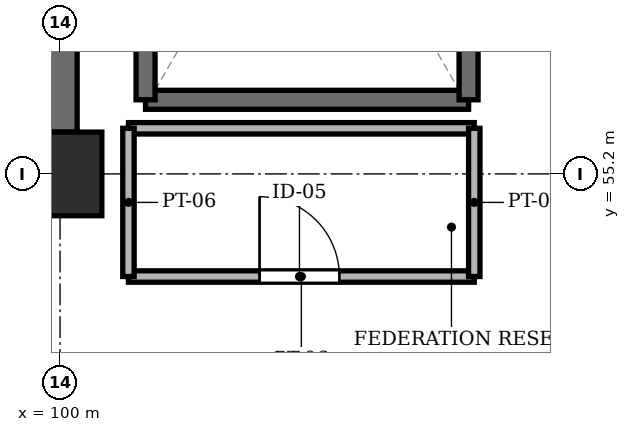
"""IFC4 building model, lengths in metres.
Left out: names, types, materials, properties, quantities, classifications, styles, units other than length and angle.
Written with IfcOpenShell. Run it as: python <this file> out.ifc"""

import sys

from ifc_helpers import new_model, si_unit, direction, frame, frame_2d, origin, origin_2d, place, context, subcontext, project, spatial, rectangle, extrude, element, fill, save


model = new_model("IFC4")
c1 = context("Model", 3, precision=1e-05, world=origin(), true_north=direction((0.0, 1.0)))
c2 = subcontext(c1, "Body", "Model", "MODEL_VIEW")
j1 = project(units=[si_unit("LENGTHUNIT", "METRE"), si_unit("PLANEANGLEUNIT", "RADIAN")], contexts=[c1])
p1 = place(None, origin())
s1 = spatial("IfcSite", under=j1, at=p1, CompositionType="ELEMENT")
p2 = place(p1, origin())
s2 = spatial("IfcBuilding", under=s1, at=p2, CompositionType="ELEMENT")
p3 = place(p2, frame((0.0, 0.0, 34.05)))
s3 = spatial("IfcBuildingStorey", under=s2, at=p3, CompositionType="ELEMENT", Elevation=34.05)
p4 = place(p3, frame((100.0, 55.2, -0.25), z_axis=(0.0, 0.0, 1.0), x_axis=(1.0, 0.0, 0.0)))
e1 = element("IfcColumn", 1, at=p4, inside=s3, PredefinedType="COLUMN", context=c2, shape_type="SweptSolid", body=[
    extrude(rectangle(XDim=1.1, YDim=1.1, at=origin_2d()), origin(), (0.0, 0.0, 1.0), 3.25),
])
p5 = place(p3, frame((100.0, 55.75, 0.0), z_axis=(0.0, 0.0, 1.0), x_axis=(0.0, 1.0, 0.0)))
e2 = element("IfcWall", 2, at=p5, inside=s3, PredefinedType="SHEAR", context=c2, shape_type="SweptSolid", body=[
    extrude(rectangle(XDim=6.2, YDim=0.45, at=frame_2d((3.1, 0.0))), origin(), (0.0, 0.0, 1.0), 3.0),
])
p6 = place(p3, frame((101.125, 56.175, 0.0), z_axis=(0.0, 0.0, 1.0), x_axis=(1.0, 0.0, 0.0)))
e3 = element("IfcWall", 3, at=p6, inside=s3, PredefinedType="SHEAR", context=c2, shape_type="SweptSolid", body=[
    extrude(rectangle(XDim=4.25, YDim=0.25, at=frame_2d((2.125, 0.0))), origin(), (0.0, 0.0, 1.0), 3.0),
])
for number, where, z_axis, x_axis in (
    (4, (101.125, 63.375, 0.0), (0.0, 0.0, 1.0), (0.0, -1.0, 0.0)),
    (5, (105.375, 56.175, 0.0), (0.0, 0.0, 1.0), (0.0, 1.0, 0.0)),
):
    element("IfcWall", number, at=place(p3, frame(where, z_axis=z_axis, x_axis=x_axis)), inside=s3, PredefinedType="SHEAR", context=c2, shape_type="SweptSolid", body=[
        extrude(rectangle(XDim=7.2, YDim=0.25, at=frame_2d((3.6, 0.0))), origin(), (0.0, 0.0, 1.0), 3.0),
    ])
p7 = place(p3, frame((100.9, 53.85, 0.0), z_axis=(0.0, 0.0, 1.0), x_axis=(1.0, 0.0, 0.0)))
e6 = element("IfcWall", 6, at=p7, inside=s3, PredefinedType="PARTITIONING", context=c2, shape_type="SweptSolid", body=[
    extrude(rectangle(XDim=4.55, YDim=0.15, at=frame_2d((2.275, 0.0))), origin(), (0.0, 0.0, 1.0), 2.53),
])
p8 = place(p7, frame((1.725, 0.0, 0.0)))
e7 = element("IfcOpeningElement", 7, at=p8, cuts=e6, PredefinedType="OPENING", context=c2, shape_type="SweptSolid", body=[
    extrude(rectangle(XDim=1.05, YDim=2.15, at=frame_2d((0.525, 1.075))), frame((0.0, 0.087, 0.0), z_axis=(0.0, -1.0, 0.0), x_axis=(1.0, 0.0, 0.0)), (0.0, 0.0, 1.0), 0.174),
])
p9 = place(p3, frame((100.9, 55.8, 0.0), z_axis=(0.0, 0.0, 1.0), x_axis=(1.0, 0.0, 0.0)))
e8 = element("IfcWall", 8, at=p9, inside=s3, PredefinedType="PARTITIONING", context=c2, shape_type="SweptSolid", body=[
    extrude(rectangle(XDim=4.55, YDim=0.15, at=frame_2d((2.275, 0.0))), origin(), (0.0, 0.0, 1.0), 2.53),
])
for number, where, z_axis, x_axis in (
    (9, (100.9, 53.85, 0.0), (0.0, 0.0, 1.0), (0.0, 1.0, 0.0)),
    (10, (105.45, 53.85, 0.0), (0.0, 0.0, 1.0), (0.0, 1.0, 0.0)),
):
    element("IfcWall", number, at=place(p3, frame(where, z_axis=z_axis, x_axis=x_axis)), inside=s3, PredefinedType="PARTITIONING", context=c2, shape_type="SweptSolid", body=[
        extrude(rectangle(XDim=1.95, YDim=0.15, at=frame_2d((0.975, 0.0))), origin(), (0.0, 0.0, 1.0), 2.53),
    ])
p10 = place(p8, origin())
e11 = element("IfcDoor", 11, at=p10, inside=s3, OperationType="SINGLE_SWING_LEFT", PredefinedType="DOOR", context=c2, shape_type="SweptSolid", body=[
    extrude(rectangle(XDim=1.05, YDim=2.15, at=frame_2d((0.525, 1.075))), frame((0.0, 0.025, 0.0), z_axis=(0.0, -1.0, 0.0), x_axis=(1.0, 0.0, 0.0)), (0.0, 0.0, 1.0), 0.05),
])
fill(e7, e11)
save(model, sys.argv[1])
